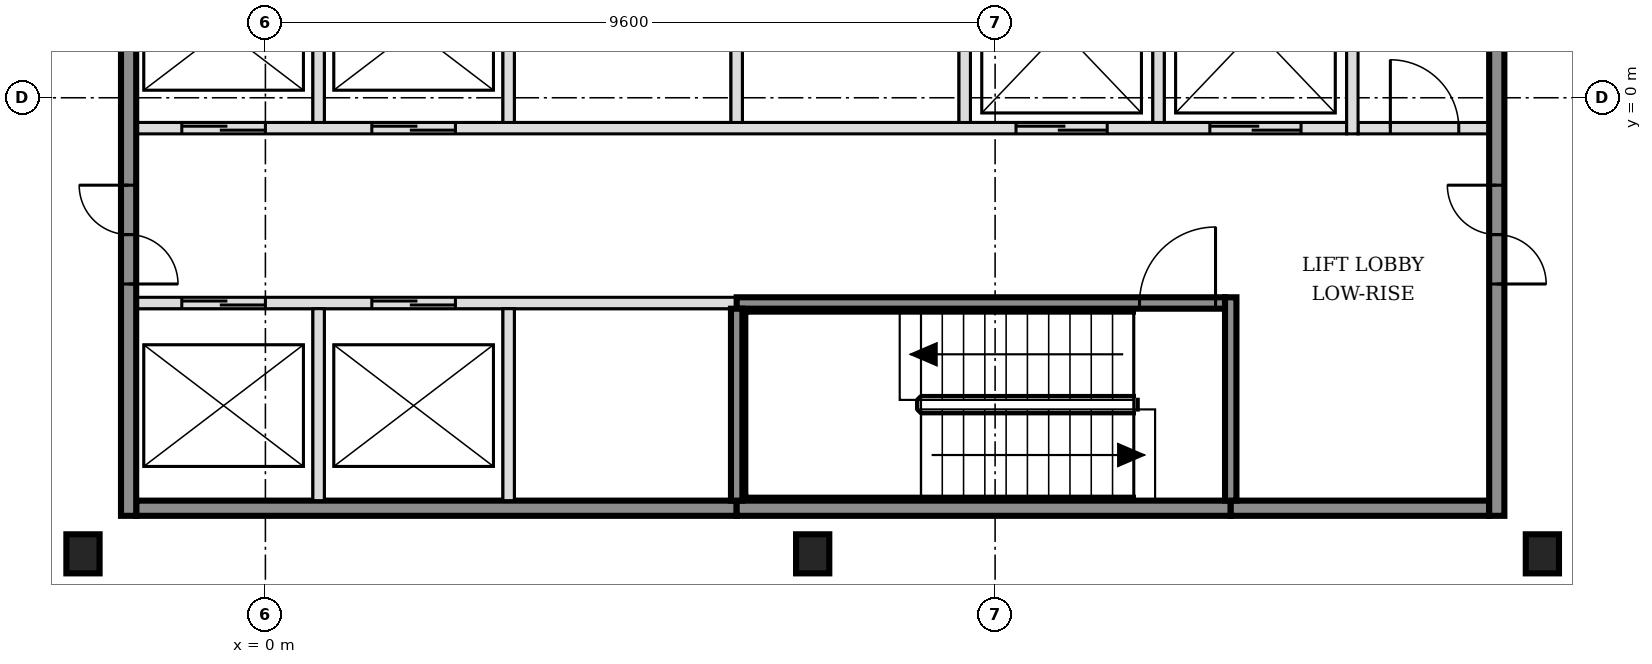
"""IFC4 building model, lengths in metres.
Left out: names, types, materials, properties, quantities, classifications, styles, units other than length and angle.
Written with IfcOpenShell. Run it as: python <this file> out.ifc"""

import sys

from ifc_helpers import new_model, si_unit, direction, frame, frame_2d, origin, origin_2d, place, context, subcontext, project, spatial, rectangle, i_section, extrude, element, fill, save


model = new_model("IFC4")
c1 = context("Model", 3, precision=1e-05, world=origin(), true_north=direction((0.0, 1.0)))
c2 = subcontext(c1, "Body", "Model", "MODEL_VIEW")
j1 = project(units=[si_unit("LENGTHUNIT", "METRE"), si_unit("PLANEANGLEUNIT", "RADIAN")], contexts=[c1])
p1 = place(None, origin())
s1 = spatial("IfcSite", under=j1, at=p1, CompositionType="ELEMENT")
p2 = place(p1, origin())
s2 = spatial("IfcBuilding", under=s1, at=p2, CompositionType="ELEMENT")
p3 = place(p2, frame((0.0, 0.0, 79.8)))
s3 = spatial("IfcBuildingStorey", under=s2, at=p3, CompositionType="ELEMENT", Elevation=79.8)
for number, where, z_axis, x_axis in (
    (1, (-2.4, -6.0, -0.15), (0.0, 0.0, 1.0), (1.0, 0.0, 0.0)),
    (2, (7.2, -6.0, -0.15), (0.0, 0.0, 1.0), (1.0, 0.0, 0.0)),
    (3, (16.8, -6.0, -0.15), (0.0, 0.0, 1.0), (1.0, 0.0, 0.0)),
):
    element("IfcColumn", number, at=place(p3, frame(where, z_axis=z_axis, x_axis=x_axis)), inside=s3, PredefinedType="COLUMN", context=c2, shape_type="SweptSolid", body=[
        extrude(i_section(OverallWidth=0.437, OverallDepth=0.514, WebThickness=0.061, FlangeThickness=0.097, FilletRadius=0.015, at=origin_2d()), origin(), (0.0, 0.0, 1.0), 3.6),
    ])
p4 = place(p3, frame((-1.7, -5.4, 0.0), z_axis=(0.0, 0.0, 1.0), x_axis=(1.0, 0.0, 0.0)))
e4 = element("IfcWall", 4, at=p4, inside=s3, PredefinedType="SOLIDWALL", context=c2, shape_type="SweptSolid", body=[
    extrude(rectangle(XDim=7.9, YDim=0.2, at=frame_2d((3.95, 0.0))), origin(), (0.0, 0.0, 1.0), 3.45),
])
p5 = place(p3, frame((6.2, -5.4, 0.0), z_axis=(0.0, 0.0, 1.0), x_axis=(1.0, 0.0, 0.0)))
e5 = element("IfcWall", 5, at=p5, inside=s3, PredefinedType="SOLIDWALL", context=c2, shape_type="SweptSolid", body=[
    extrude(rectangle(XDim=6.5, YDim=0.2, at=frame_2d((3.25, 0.0))), origin(), (0.0, 0.0, 1.0), 3.45),
])
p6 = place(p3, frame((12.7, -5.4, 0.0), z_axis=(0.0, 0.0, 1.0), x_axis=(1.0, 0.0, 0.0)))
e6 = element("IfcWall", 6, at=p6, inside=s3, PredefinedType="SOLIDWALL", context=c2, shape_type="SweptSolid", body=[
    extrude(rectangle(XDim=3.4, YDim=0.2, at=frame_2d((1.7, 0.0))), origin(), (0.0, 0.0, 1.0), 3.45),
])
p7 = place(p3, frame((-1.7, -2.7, 0.0), z_axis=(0.0, 0.0, 1.0), x_axis=(1.0, 0.0, 0.0)))
e7 = element("IfcWall", 7, at=p7, inside=s3, PredefinedType="SOLIDWALL", context=c2, shape_type="SweptSolid", body=[
    extrude(rectangle(XDim=7.9, YDim=0.15, at=frame_2d((3.95, 0.0))), origin(), (0.0, 0.0, 1.0), 3.45),
])
p8 = place(p7, frame((0.6, 0.0, 0.0)))
e8 = element("IfcOpeningElement", 8, at=p8, cuts=e7, PredefinedType="OPENING", context=c2, shape_type="SweptSolid", body=[
    extrude(rectangle(XDim=1.1, YDim=2.1, at=frame_2d((0.55, 1.05))), frame((0.0, 0.085, 0.0), z_axis=(0.0, -1.0, 0.0), x_axis=(1.0, 0.0, 0.0)), (0.0, 0.0, 1.0), 0.17),
])
p9 = place(p7, frame((3.1, 0.0, 0.0)))
e9 = element("IfcOpeningElement", 9, at=p9, cuts=e7, PredefinedType="OPENING", context=c2, shape_type="SweptSolid", body=[
    extrude(rectangle(XDim=1.1, YDim=2.1, at=frame_2d((0.55, 1.05))), frame((0.0, 0.085, 0.0), z_axis=(0.0, -1.0, 0.0), x_axis=(1.0, 0.0, 0.0)), (0.0, 0.0, 1.0), 0.17),
])
p10 = place(p3, frame((6.2, -2.7, 0.0), z_axis=(0.0, 0.0, 1.0), x_axis=(1.0, 0.0, 0.0)))
e10 = element("IfcWall", 10, at=p10, inside=s3, PredefinedType="SOLIDWALL", context=c2, shape_type="SweptSolid", body=[
    extrude(rectangle(XDim=6.425, YDim=0.15, at=frame_2d((3.212, 0.0))), origin(), (0.0, 0.0, 1.0), 3.45),
])
p11 = place(p10, frame((5.3, 0.0, 0.0)))
e11 = element("IfcOpeningElement", 11, at=p11, cuts=e10, PredefinedType="OPENING", context=c2, shape_type="SweptSolid", body=[
    extrude(rectangle(XDim=1.0, YDim=2.1, at=frame_2d((0.5, 1.05))), frame((0.0, 0.085, 0.0), z_axis=(0.0, -1.0, 0.0), x_axis=(1.0, 0.0, 0.0)), (0.0, 0.0, 1.0), 0.17),
])
p12 = place(p3, frame((-1.7, -0.4, 0.0), z_axis=(0.0, 0.0, 1.0), x_axis=(1.0, 0.0, 0.0)))
e12 = element("IfcWall", 12, at=p12, inside=s3, PredefinedType="SOLIDWALL", context=c2, shape_type="SweptSolid", body=[
    extrude(rectangle(XDim=15.925, YDim=0.15, at=frame_2d((7.962, 0.0))), origin(), (0.0, 0.0, 1.0), 3.45),
])
p13 = place(p12, frame((0.6, 0.0, 0.0)))
e13 = element("IfcOpeningElement", 13, at=p13, cuts=e12, PredefinedType="OPENING", context=c2, shape_type="SweptSolid", body=[
    extrude(rectangle(XDim=1.1, YDim=2.1, at=frame_2d((0.55, 1.05))), frame((0.0, 0.085, 0.0), z_axis=(0.0, -1.0, 0.0), x_axis=(1.0, 0.0, 0.0)), (0.0, 0.0, 1.0), 0.17),
])
p14 = place(p12, frame((3.1, 0.0, 0.0)))
e14 = element("IfcOpeningElement", 14, at=p14, cuts=e12, PredefinedType="OPENING", context=c2, shape_type="SweptSolid", body=[
    extrude(rectangle(XDim=1.1, YDim=2.1, at=frame_2d((0.55, 1.05))), frame((0.0, 0.085, 0.0), z_axis=(0.0, -1.0, 0.0), x_axis=(1.0, 0.0, 0.0)), (0.0, 0.0, 1.0), 0.17),
])
p15 = place(p12, frame((11.575, 0.0, 0.0)))
e15 = element("IfcOpeningElement", 15, at=p15, cuts=e12, PredefinedType="OPENING", context=c2, shape_type="SweptSolid", body=[
    extrude(rectangle(XDim=1.2, YDim=2.1, at=frame_2d((0.6, 1.05))), frame((0.0, 0.085, 0.0), z_axis=(0.0, -1.0, 0.0), x_axis=(1.0, 0.0, 0.0)), (0.0, 0.0, 1.0), 0.17),
])
p16 = place(p12, frame((14.125, 0.0, 0.0)))
e16 = element("IfcOpeningElement", 16, at=p16, cuts=e12, PredefinedType="OPENING", context=c2, shape_type="SweptSolid", body=[
    extrude(rectangle(XDim=1.2, YDim=2.1, at=frame_2d((0.6, 1.05))), frame((0.0, 0.085, 0.0), z_axis=(0.0, -1.0, 0.0), x_axis=(1.0, 0.0, 0.0)), (0.0, 0.0, 1.0), 0.17),
])
p17 = place(p3, frame((14.375, -0.4, 0.0), z_axis=(0.0, 0.0, 1.0), x_axis=(1.0, 0.0, 0.0)))
e17 = element("IfcWall", 17, at=p17, inside=s3, PredefinedType="PARTITIONING", context=c2, shape_type="SweptSolid", body=[
    extrude(rectangle(XDim=1.725, YDim=0.15, at=frame_2d((0.863, 0.0))), origin(), (0.0, 0.0, 1.0), 3.45),
])
p18 = place(p17, frame((0.425, 0.0, 0.0)))
e18 = element("IfcOpeningElement", 18, at=p18, cuts=e17, PredefinedType="OPENING", context=c2, shape_type="SweptSolid", body=[
    extrude(rectangle(XDim=0.9, YDim=2.1, at=frame_2d((0.45, 1.05))), frame((0.0, 0.085, 0.0), z_axis=(0.0, -1.0, 0.0), x_axis=(1.0, 0.0, 0.0)), (0.0, 0.0, 1.0), 0.17),
])
p19 = place(p3, frame((-1.8, -5.5, 0.0), z_axis=(0.0, 0.0, 1.0), x_axis=(0.0, 1.0, 0.0)))
e19 = element("IfcWall", 19, at=p19, inside=s3, PredefinedType="SOLIDWALL", context=c2, shape_type="SweptSolid", body=[
    extrude(rectangle(XDim=15.8, YDim=0.2, at=frame_2d((7.9, 0.0))), origin(), (0.0, 0.0, 1.0), 3.45),
])
p20 = place(p19, frame((3.05, 0.0, 0.0)))
e20 = element("IfcOpeningElement", 20, at=p20, cuts=e19, PredefinedType="OPENING", context=c2, shape_type="SweptSolid", body=[
    extrude(rectangle(XDim=1.3, YDim=2.1, at=frame_2d((0.65, 1.05))), frame((0.0, 0.11, 0.0), z_axis=(0.0, -1.0, 0.0), x_axis=(1.0, 0.0, 0.0)), (0.0, 0.0, 1.0), 0.22),
])
p21 = place(p19, frame((11.45, 0.0, 0.0)))
e21 = element("IfcOpeningElement", 21, at=p21, cuts=e19, PredefinedType="OPENING", context=c2, shape_type="SweptSolid", body=[
    extrude(rectangle(XDim=1.3, YDim=2.1, at=frame_2d((0.65, 1.05))), frame((0.0, 0.11, 0.0), z_axis=(0.0, -1.0, 0.0), x_axis=(1.0, 0.0, 0.0)), (0.0, 0.0, 1.0), 0.22),
])
p22 = place(p3, frame((0.7, -5.3, 0.0), z_axis=(0.0, 0.0, 1.0), x_axis=(0.0, 1.0, 0.0)))
e22 = element("IfcWall", 22, at=p22, inside=s3, PredefinedType="SOLIDWALL", context=c2, shape_type="SweptSolid", body=[
    extrude(rectangle(XDim=2.525, YDim=0.15, at=frame_2d((1.263, 0.0))), origin(), (0.0, 0.0, 1.0), 3.45),
])
p23 = place(p3, frame((0.7, -0.325, 0.0), z_axis=(0.0, 0.0, 1.0), x_axis=(0.0, 1.0, 0.0)))
e23 = element("IfcWall", 23, at=p23, inside=s3, PredefinedType="SOLIDWALL", context=c2, shape_type="SweptSolid", body=[
    extrude(rectangle(XDim=2.45, YDim=0.15, at=frame_2d((1.225, 0.0))), origin(), (0.0, 0.0, 1.0), 3.45),
])
p24 = place(p3, frame((3.2, -5.3, 0.0), z_axis=(0.0, 0.0, 1.0), x_axis=(0.0, 1.0, 0.0)))
e24 = element("IfcWall", 24, at=p24, inside=s3, PredefinedType="SOLIDWALL", context=c2, shape_type="SweptSolid", body=[
    extrude(rectangle(XDim=2.525, YDim=0.15, at=frame_2d((1.263, 0.0))), origin(), (0.0, 0.0, 1.0), 3.45),
])
p25 = place(p3, frame((3.2, -0.325, 0.0), z_axis=(0.0, 0.0, 1.0), x_axis=(0.0, 1.0, 0.0)))
e25 = element("IfcWall", 25, at=p25, inside=s3, PredefinedType="SOLIDWALL", context=c2, shape_type="SweptSolid", body=[
    extrude(rectangle(XDim=2.45, YDim=0.15, at=frame_2d((1.225, 0.0))), origin(), (0.0, 0.0, 1.0), 3.45),
])
p26 = place(p3, frame((6.2, -5.3, 0.0), z_axis=(0.0, 0.0, 1.0), x_axis=(0.0, 1.0, 0.0)))
e26 = element("IfcWall", 26, at=p26, inside=s3, PredefinedType="SOLIDWALL", context=c2, shape_type="SweptSolid", body=[
    extrude(rectangle(XDim=2.525, YDim=0.15, at=frame_2d((1.263, 0.0))), origin(), (0.0, 0.0, 1.0), 3.45),
])
for number, where, z_axis, x_axis in (
    (27, (6.2, -0.325, 0.0), (0.0, 0.0, 1.0), (0.0, 1.0, 0.0)),
    (28, (9.2, -0.325, 0.0), (0.0, 0.0, 1.0), (0.0, 1.0, 0.0)),
    (29, (11.75, -0.325, 0.0), (0.0, 0.0, 1.0), (0.0, 1.0, 0.0)),
):
    element("IfcWall", number, at=place(p3, frame(where, z_axis=z_axis, x_axis=x_axis)), inside=s3, PredefinedType="SOLIDWALL", context=c2, shape_type="SweptSolid", body=[
        extrude(rectangle(XDim=2.45, YDim=0.15, at=frame_2d((1.225, 0.0))), origin(), (0.0, 0.0, 1.0), 3.45),
    ])
p27 = place(p3, frame((12.7, -5.3, 0.0), z_axis=(0.0, 0.0, 1.0), x_axis=(0.0, 1.0, 0.0)))
e30 = element("IfcWall", 30, at=p27, inside=s3, PredefinedType="SOLIDWALL", context=c2, shape_type="SweptSolid", body=[
    extrude(rectangle(XDim=2.675, YDim=0.15, at=frame_2d((1.337, 0.0))), origin(), (0.0, 0.0, 1.0), 3.45),
])
p28 = place(p3, frame((14.3, -0.475, 0.0), z_axis=(0.0, 0.0, 1.0), x_axis=(0.0, 1.0, 0.0)))
e31 = element("IfcWall", 31, at=p28, inside=s3, PredefinedType="SOLIDWALL", context=c2, shape_type="SweptSolid", body=[
    extrude(rectangle(XDim=2.75, YDim=0.15, at=frame_2d((1.375, 0.0))), origin(), (0.0, 0.0, 1.0), 3.45),
])
p29 = place(p3, frame((16.2, -5.5, 0.0), z_axis=(0.0, 0.0, 1.0), x_axis=(0.0, 1.0, 0.0)))
e32 = element("IfcWall", 32, at=p29, inside=s3, PredefinedType="SOLIDWALL", context=c2, shape_type="SweptSolid", body=[
    extrude(rectangle(XDim=15.8, YDim=0.2, at=frame_2d((7.9, 0.0))), origin(), (0.0, 0.0, 1.0), 3.45),
])
p30 = place(p29, frame((3.05, 0.0, 0.0)))
e33 = element("IfcOpeningElement", 33, at=p30, cuts=e32, PredefinedType="OPENING", context=c2, shape_type="SweptSolid", body=[
    extrude(rectangle(XDim=1.3, YDim=2.1, at=frame_2d((0.65, 1.05))), frame((0.0, 0.11, 0.0), z_axis=(0.0, -1.0, 0.0), x_axis=(1.0, 0.0, 0.0)), (0.0, 0.0, 1.0), 0.22),
])
p31 = place(p29, frame((11.45, 0.0, 0.0)))
e34 = element("IfcOpeningElement", 34, at=p31, cuts=e32, PredefinedType="OPENING", context=c2, shape_type="SweptSolid", body=[
    extrude(rectangle(XDim=1.3, YDim=2.1, at=frame_2d((0.65, 1.05))), frame((0.0, 0.11, 0.0), z_axis=(0.0, -1.0, 0.0), x_axis=(1.0, 0.0, 0.0)), (0.0, 0.0, 1.0), 0.22),
])
p32 = place(p8, origin())
e35 = element("IfcDoor", 35, at=p32, inside=s3, OperationType="DOUBLE_DOOR_SLIDING", PredefinedType="DOOR", context=c2, shape_type="SweptSolid", body=[
    extrude(rectangle(XDim=1.1, YDim=2.1, at=frame_2d((0.55, 1.05))), frame((0.0, 0.025, 0.0), z_axis=(0.0, -1.0, 0.0), x_axis=(1.0, 0.0, 0.0)), (0.0, 0.0, 1.0), 0.05),
])
fill(e8, e35)
p33 = place(p9, origin())
e36 = element("IfcDoor", 36, at=p33, inside=s3, OperationType="DOUBLE_DOOR_SLIDING", PredefinedType="DOOR", context=c2, shape_type="SweptSolid", body=[
    extrude(rectangle(XDim=1.1, YDim=2.1, at=frame_2d((0.55, 1.05))), frame((0.0, 0.025, 0.0), z_axis=(0.0, -1.0, 0.0), x_axis=(1.0, 0.0, 0.0)), (0.0, 0.0, 1.0), 0.05),
])
fill(e9, e36)
p34 = place(p13, origin())
e37 = element("IfcDoor", 37, at=p34, inside=s3, OperationType="DOUBLE_DOOR_SLIDING", PredefinedType="DOOR", context=c2, shape_type="SweptSolid", body=[
    extrude(rectangle(XDim=1.1, YDim=2.1, at=frame_2d((0.55, 1.05))), frame((0.0, 0.025, 0.0), z_axis=(0.0, -1.0, 0.0), x_axis=(1.0, 0.0, 0.0)), (0.0, 0.0, 1.0), 0.05),
])
fill(e13, e37)
p35 = place(p14, origin())
e38 = element("IfcDoor", 38, at=p35, inside=s3, OperationType="DOUBLE_DOOR_SLIDING", PredefinedType="DOOR", context=c2, shape_type="SweptSolid", body=[
    extrude(rectangle(XDim=1.1, YDim=2.1, at=frame_2d((0.55, 1.05))), frame((0.0, 0.025, 0.0), z_axis=(0.0, -1.0, 0.0), x_axis=(1.0, 0.0, 0.0)), (0.0, 0.0, 1.0), 0.05),
])
fill(e14, e38)
p36 = place(p15, origin())
e39 = element("IfcDoor", 39, at=p36, inside=s3, OperationType="DOUBLE_DOOR_SLIDING", PredefinedType="DOOR", context=c2, shape_type="SweptSolid", body=[
    extrude(rectangle(XDim=1.2, YDim=2.1, at=frame_2d((0.6, 1.05))), frame((0.0, 0.025, 0.0), z_axis=(0.0, -1.0, 0.0), x_axis=(1.0, 0.0, 0.0)), (0.0, 0.0, 1.0), 0.05),
])
fill(e15, e39)
p37 = place(p16, origin())
e40 = element("IfcDoor", 40, at=p37, inside=s3, OperationType="DOUBLE_DOOR_SLIDING", PredefinedType="DOOR", context=c2, shape_type="SweptSolid", body=[
    extrude(rectangle(XDim=1.2, YDim=2.1, at=frame_2d((0.6, 1.05))), frame((0.0, 0.025, 0.0), z_axis=(0.0, -1.0, 0.0), x_axis=(1.0, 0.0, 0.0)), (0.0, 0.0, 1.0), 0.05),
])
fill(e16, e40)
p38 = place(p11, origin())
e41 = element("IfcDoor", 41, at=p38, inside=s3, OperationType="SINGLE_SWING_RIGHT", PredefinedType="DOOR", context=c2, shape_type="SweptSolid", body=[
    extrude(rectangle(XDim=1.0, YDim=2.1, at=frame_2d((0.5, 1.05))), frame((0.0, 0.025, 0.0), z_axis=(0.0, -1.0, 0.0), x_axis=(1.0, 0.0, 0.0)), (0.0, 0.0, 1.0), 0.05),
])
fill(e11, e41)
p39 = place(p20, origin())
e42 = element("IfcDoor", 42, at=p39, inside=s3, OperationType="DOUBLE_DOOR_SINGLE_SWING", PredefinedType="DOOR", context=c2, shape_type="SweptSolid", body=[
    extrude(rectangle(XDim=1.3, YDim=2.1, at=frame_2d((0.65, 1.05))), frame((0.0, 0.025, 0.0), z_axis=(0.0, -1.0, 0.0), x_axis=(1.0, 0.0, 0.0)), (0.0, 0.0, 1.0), 0.05),
])
fill(e20, e42)
p40 = place(p30, origin())
e43 = element("IfcDoor", 43, at=p40, inside=s3, OperationType="DOUBLE_DOOR_SINGLE_SWING", PredefinedType="DOOR", context=c2, shape_type="SweptSolid", body=[
    extrude(rectangle(XDim=1.3, YDim=2.1, at=frame_2d((0.65, 1.05))), frame((0.0, 0.025, 0.0), z_axis=(0.0, -1.0, 0.0), x_axis=(1.0, 0.0, 0.0)), (0.0, 0.0, 1.0), 0.05),
])
fill(e33, e43)
p41 = place(p18, origin())
e44 = element("IfcDoor", 44, at=p41, inside=s3, OperationType="SINGLE_SWING_LEFT", PredefinedType="DOOR", context=c2, shape_type="SweptSolid", body=[
    extrude(rectangle(XDim=0.9, YDim=2.1, at=frame_2d((0.45, 1.05))), frame((0.0, 0.025, 0.0), z_axis=(0.0, -1.0, 0.0), x_axis=(1.0, 0.0, 0.0)), (0.0, 0.0, 1.0), 0.05),
])
fill(e18, e44)
save(model, sys.argv[1])
